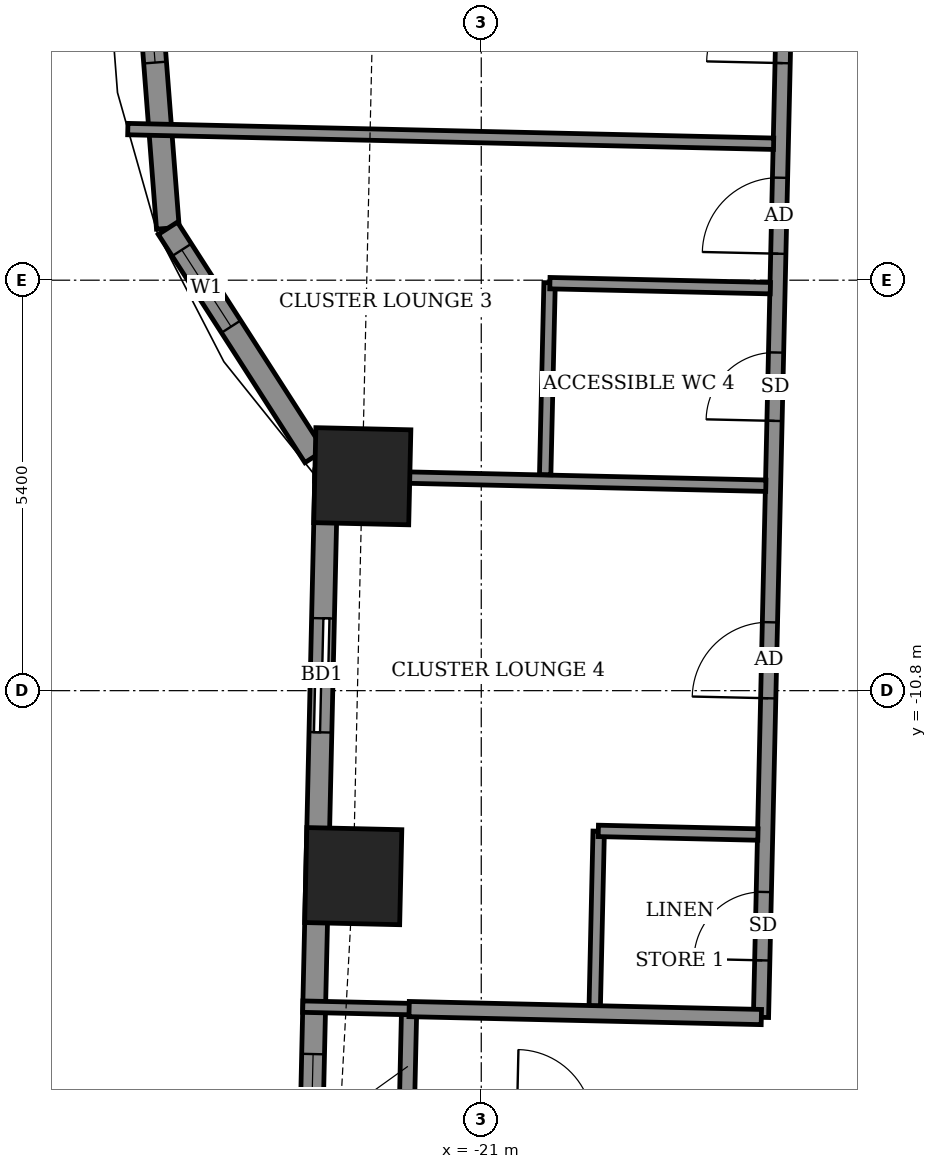
"""IFC4 building model, lengths in metres.
Left out: names, types, materials, properties, quantities, classifications, styles, units other than length and angle.
Written with IfcOpenShell. Run it as: python <this file> out.ifc"""

import sys

from ifc_helpers import new_model, si_unit, direction, frame, frame_2d, origin, origin_2d, place, context, subcontext, project, spatial, rectangle, extrude, element, fill, save


model = new_model("IFC4")
c1 = context("Model", 3, precision=1e-05, world=origin(), true_north=direction((0.0, 1.0)))
c2 = subcontext(c1, "Body", "Model", "MODEL_VIEW")
j1 = project(units=[si_unit("LENGTHUNIT", "METRE"), si_unit("PLANEANGLEUNIT", "RADIAN")], contexts=[c1])
p1 = place(None, origin())
s1 = spatial("IfcSite", under=j1, at=p1, CompositionType="ELEMENT")
p2 = place(p1, origin())
s2 = spatial("IfcBuilding", under=s1, at=p2, CompositionType="ELEMENT")
p3 = place(p2, frame((0.0, 0.0, 152.7)))
s3 = spatial("IfcBuildingStorey", under=s2, at=p3, CompositionType="ELEMENT", Elevation=152.7)
for number, where, z_axis, x_axis in (
    (1, (-22.565, -7.979, -0.55), (0.0, 0.0, 1.0), (-0.023, -1.0, 0.0)),
    (2, (-22.684, -13.24, -0.55), (0.0, 0.0, 1.0), (-0.023, -1.0, 0.0)),
):
    element("IfcColumn", number, at=place(p3, frame(where, z_axis=z_axis, x_axis=x_axis)), inside=s3, PredefinedType="COLUMN", context=c2, shape_type="SweptSolid", body=[
        extrude(rectangle(XDim=1.25, YDim=1.25, at=origin_2d()), origin(), (0.0, 0.0, 1.0), 3.6),
    ])
p4 = place(p3, frame((-25.552, 0.84, 0.0), z_axis=(0.0, 0.0, 1.0), x_axis=(0.076961115238, -0.997034095075, 0.0)))
e3 = element("IfcWall", 3, at=p4, inside=s3, PredefinedType="SOLIDWALL", context=c2, shape_type="SweptSolid", body=[
    extrude(rectangle(XDim=5.574, YDim=0.3, at=frame_2d((2.787, 0.0))), origin(), (0.0, 0.0, 1.0), 3.05),
])
p5 = place(p4, frame((2.187, 0.0, 0.9)))
e4 = element("IfcOpeningElement", 4, at=p5, cuts=e3, PredefinedType="OPENING", context=c2, shape_type="SweptSolid", body=[
    extrude(rectangle(XDim=1.2, YDim=1.5, at=frame_2d((0.6, 0.75))), frame((0.0, 0.16, 0.0), z_axis=(0.0, -1.0, 0.0), x_axis=(1.0, 0.0, 0.0)), (0.0, 0.0, 1.0), 0.32),
])
p6 = place(p3, frame((-25.123, -4.717, 0.0), z_axis=(0.0, 0.0, 1.0), x_axis=(0.54058467792, -0.841289608873, 0.0)))
e5 = element("IfcWall", 5, at=p6, inside=s3, PredefinedType="SOLIDWALL", context=c2, shape_type="SweptSolid", body=[
    extrude(rectangle(XDim=3.568, YDim=0.3, at=frame_2d((1.784, 0.0))), origin(), (0.0, 0.0, 1.0), 3.05),
])
p7 = place(p6, frame((0.338, 0.0, 0.9)))
e6 = element("IfcOpeningElement", 6, at=p7, cuts=e5, PredefinedType="OPENING", context=c2, shape_type="SweptSolid", body=[
    extrude(rectangle(XDim=1.2, YDim=1.5, at=frame_2d((0.6, 0.75))), frame((0.0, 0.16, 0.0), z_axis=(0.0, -1.0, 0.0), x_axis=(1.0, 0.0, 0.0)), (0.0, 0.0, 1.0), 0.32),
])
p8 = place(p3, frame((-23.038, -7.913, 0.0), z_axis=(0.0, 0.0, 1.0), x_axis=(-0.022705985163, -0.999742185885, 0.0)))
e7 = element("IfcWall", 7, at=p8, inside=s3, PredefinedType="SOLIDWALL", context=c2, shape_type="SweptSolid", body=[
    extrude(rectangle(XDim=10.43, YDim=0.3, at=frame_2d((5.215, 0.0))), origin(), (0.0, 0.0, 1.0), 3.05),
])
p9 = place(p8, frame((1.936, 0.0, 0.0)))
e8 = element("IfcOpeningElement", 8, at=p9, cuts=e7, PredefinedType="OPENING", context=c2, shape_type="SweptSolid", body=[
    extrude(rectangle(XDim=1.5, YDim=2.4, at=frame_2d((0.75, 1.2))), frame((0.0, 0.16, 0.0), z_axis=(0.0, -1.0, 0.0), x_axis=(1.0, 0.0, 0.0)), (0.0, 0.0, 1.0), 0.32),
])
p10 = place(p8, frame((7.67, 0.0, 0.9)))
e9 = element("IfcOpeningElement", 9, at=p10, cuts=e7, PredefinedType="OPENING", context=c2, shape_type="SweptSolid", body=[
    extrude(rectangle(XDim=1.2, YDim=1.5, at=frame_2d((0.6, 0.75))), frame((0.0, 0.16, 0.0), z_axis=(0.0, -1.0, 0.0), x_axis=(1.0, 0.0, 0.0)), (0.0, 0.0, 1.0), 0.32),
])
p11 = place(p3, frame((-25.988, -16.028, 0.0), z_axis=(0.0, 0.0, 1.0), x_axis=(0.022662255828, 0.999743178102, 0.0)))
e10 = element("IfcWall", 10, at=p11, inside=s3, PredefinedType="USERDEFINED", context=c2, shape_type="SweptSolid", body=[
    extrude(rectangle(XDim=6.0, YDim=0.55, at=frame_2d((3.0, 0.0))), origin(), (0.0, 0.0, 1.0), 0.8),
])
p12 = place(p3, frame((-21.983, -16.493, 0.0), z_axis=(0.0, 0.0, 1.0), x_axis=(0.022617910375, 0.999744182344, 0.0)))
e11 = element("IfcWall", 11, at=p12, inside=s3, PredefinedType="PARTITIONING", context=c2, shape_type="SweptSolid", body=[
    extrude(rectangle(XDim=1.5, YDim=0.2, at=frame_2d((0.75, 0.0))), origin(), (0.0, 0.0, 1.0), 3.05),
])
p13 = place(p3, frame((-19.507, -14.949, 0.0), z_axis=(0.0, 0.0, 1.0), x_axis=(0.022603288534, 0.999744513037, 0.0)))
e12 = element("IfcWall", 12, at=p13, inside=s3, PredefinedType="PARTITIONING", context=c2, shape_type="SweptSolid", body=[
    extrude(rectangle(XDim=2.301, YDim=0.15, at=frame_2d((1.15, 0.0))), origin(), (0.0, 0.0, 1.0), 3.05),
])
p14 = place(p3, frame((-17.32, -15.098, 0.0), z_axis=(0.0, 0.0, 1.0), x_axis=(0.022694293906, 0.999742451346, 0.0)))
e13 = element("IfcWall", 13, at=p14, inside=s3, PredefinedType="PARTITIONING", context=c2, shape_type="SweptSolid", body=[
    extrude(rectangle(XDim=28.024, YDim=0.2, at=frame_2d((14.012, 0.0))), origin(), (0.0, 0.0, 1.0), 3.05),
])
p15 = place(p14, frame((24.212, 0.0, 0.0)))
e14 = element("IfcOpeningElement", 14, at=p15, cuts=e13, PredefinedType="OPENING", context=c2, shape_type="SweptSolid", body=[
    extrude(rectangle(XDim=1.0, YDim=2.1, at=frame_2d((0.5, 1.05))), frame((0.0, 0.11, 0.0), z_axis=(0.0, -1.0, 0.0), x_axis=(1.0, 0.0, 0.0)), (0.0, 0.0, 1.0), 0.22),
])
p16 = place(p14, frame((26.374, 0.0, 0.0)))
e15 = element("IfcOpeningElement", 15, at=p16, cuts=e13, PredefinedType="OPENING", context=c2, shape_type="SweptSolid", body=[
    extrude(rectangle(XDim=0.9, YDim=2.1, at=frame_2d((0.45, 1.05))), frame((0.0, 0.11, 0.0), z_axis=(0.0, -1.0, 0.0), x_axis=(1.0, 0.0, 0.0)), (0.0, 0.0, 1.0), 0.22),
])
p17 = place(p14, frame((21.774, 0.0, 0.0)))
e16 = element("IfcOpeningElement", 16, at=p17, cuts=e13, PredefinedType="OPENING", context=c2, shape_type="SweptSolid", body=[
    extrude(rectangle(XDim=1.0, YDim=2.1, at=frame_2d((0.5, 1.05))), frame((0.0, 0.11, 0.0), z_axis=(0.0, -1.0, 0.0), x_axis=(1.0, 0.0, 0.0)), (0.0, 0.0, 1.0), 0.22),
])
p18 = place(p14, frame((18.65, 0.0, 0.0)))
e17 = element("IfcOpeningElement", 17, at=p18, cuts=e13, PredefinedType="OPENING", context=c2, shape_type="SweptSolid", body=[
    extrude(rectangle(XDim=1.0, YDim=2.1, at=frame_2d((0.5, 1.05))), frame((0.0, 0.11, 0.0), z_axis=(0.0, -1.0, 0.0), x_axis=(1.0, 0.0, 0.0)), (0.0, 0.0, 1.0), 0.22),
])
p19 = place(p14, frame((15.626, 0.0, 0.0)))
e18 = element("IfcOpeningElement", 18, at=p19, cuts=e13, PredefinedType="OPENING", context=c2, shape_type="SweptSolid", body=[
    extrude(rectangle(XDim=1.0, YDim=2.1, at=frame_2d((0.5, 1.05))), frame((0.0, 0.11, 0.0), z_axis=(0.0, -1.0, 0.0), x_axis=(1.0, 0.0, 0.0)), (0.0, 0.0, 1.0), 0.22),
])
p20 = place(p14, frame((12.557, 0.0, 0.0)))
e19 = element("IfcOpeningElement", 19, at=p20, cuts=e13, PredefinedType="OPENING", context=c2, shape_type="SweptSolid", body=[
    extrude(rectangle(XDim=1.0, YDim=2.1, at=frame_2d((0.5, 1.05))), frame((0.0, 0.11, 0.0), z_axis=(0.0, -1.0, 0.0), x_axis=(1.0, 0.0, 0.0)), (0.0, 0.0, 1.0), 0.22),
])
p21 = place(p14, frame((10.049, 0.0, 0.0)))
e20 = element("IfcOpeningElement", 20, at=p21, cuts=e13, PredefinedType="OPENING", context=c2, shape_type="SweptSolid", body=[
    extrude(rectangle(XDim=1.0, YDim=2.1, at=frame_2d((0.5, 1.05))), frame((0.0, 0.11, 0.0), z_axis=(0.0, -1.0, 0.0), x_axis=(1.0, 0.0, 0.0)), (0.0, 0.0, 1.0), 0.22),
])
p22 = place(p14, frame((7.849, 0.0, 0.0)))
e21 = element("IfcOpeningElement", 21, at=p22, cuts=e13, PredefinedType="OPENING", context=c2, shape_type="SweptSolid", body=[
    extrude(rectangle(XDim=0.9, YDim=2.1, at=frame_2d((0.45, 1.05))), frame((0.0, 0.11, 0.0), z_axis=(0.0, -1.0, 0.0), x_axis=(1.0, 0.0, 0.0)), (0.0, 0.0, 1.0), 0.22),
])
p23 = place(p14, frame((4.199, 0.0, 0.0)))
e22 = element("IfcOpeningElement", 22, at=p23, cuts=e13, PredefinedType="OPENING", context=c2, shape_type="SweptSolid", body=[
    extrude(rectangle(XDim=1.0, YDim=2.1, at=frame_2d((0.5, 1.05))), frame((0.0, 0.11, 0.0), z_axis=(0.0, -1.0, 0.0), x_axis=(1.0, 0.0, 0.0)), (0.0, 0.0, 1.0), 0.22),
])
p24 = place(p14, frame((0.75, 0.0, 0.0)))
e23 = element("IfcOpeningElement", 23, at=p24, cuts=e13, PredefinedType="OPENING", context=c2, shape_type="SweptSolid", body=[
    extrude(rectangle(XDim=0.9, YDim=2.1, at=frame_2d((0.45, 1.05))), frame((0.0, 0.11, 0.0), z_axis=(0.0, -1.0, 0.0), x_axis=(1.0, 0.0, 0.0)), (0.0, 0.0, 1.0), 0.22),
])
p25 = place(p3, frame((-23.348, -14.957, 0.0), z_axis=(0.0, 0.0, 1.0), x_axis=(0.999740216184, -0.022792545827, 0.0)))
e24 = element("IfcWall", 24, at=p25, inside=s3, PredefinedType="PARTITIONING", context=c2, shape_type="SweptSolid", body=[
    extrude(rectangle(XDim=1.403, YDim=0.15, at=frame_2d((0.702, 0.0))), origin(), (0.0, 0.0, 1.0), 2.55),
])
p26 = place(p3, frame((-21.949, -14.989, 0.0), z_axis=(0.0, 0.0, 1.0), x_axis=(0.999743491588, -0.022648422179, 0.0)))
e25 = element("IfcWall", 25, at=p26, inside=s3, PredefinedType="PARTITIONING", context=c2, shape_type="SweptSolid", body=[
    extrude(rectangle(XDim=4.635, YDim=0.2, at=frame_2d((2.318, 0.0))), origin(), (0.0, 0.0, 1.0), 3.05),
])
p27 = place(p3, frame((-19.46, -12.645, 0.0), z_axis=(0.0, 0.0, 1.0), x_axis=(0.999737799372, -0.022898307927, 0.0)))
e26 = element("IfcWall", 26, at=p27, inside=s3, PredefinedType="PARTITIONING", context=c2, shape_type="SweptSolid", body=[
    extrude(rectangle(XDim=2.1, YDim=0.15, at=frame_2d((1.05, 0.0))), origin(), (0.0, 0.0, 1.0), 3.05),
])
p28 = place(p3, frame((-23.19, -7.969, 0.0), z_axis=(0.0, 0.0, 1.0), x_axis=(0.999741261868, -0.022746633113, 0.0)))
e27 = element("IfcWall", 27, at=p28, inside=s3, PredefinedType="PARTITIONING", context=c2, shape_type="SweptSolid", body=[
    extrude(rectangle(XDim=5.935, YDim=0.15, at=frame_2d((2.968, 0.0))), origin(), (0.0, 0.0, 1.0), 3.05),
])
p29 = place(p3, frame((-20.159, -7.958, 0.0), z_axis=(0.0, 0.0, 1.0), x_axis=(0.022919108675, 0.999737322729, 0.0)))
e28 = element("IfcWall", 28, at=p29, inside=s3, PredefinedType="PARTITIONING", context=c2, shape_type="SweptSolid", body=[
    extrude(rectangle(XDim=2.525, YDim=0.15, at=frame_2d((1.262, 0.0))), origin(), (0.0, 0.0, 1.0), 3.05),
])
p30 = place(p3, frame((-20.097, -5.439, 0.0), z_axis=(0.0, 0.0, 1.0), x_axis=(0.999741748633, -0.022725229174, 0.0)))
e29 = element("IfcWall", 29, at=p30, inside=s3, PredefinedType="PARTITIONING", context=c2, shape_type="SweptSolid", body=[
    extrude(rectangle(XDim=2.901, YDim=0.15, at=frame_2d((1.45, 0.0))), origin(), (0.0, 0.0, 1.0), 3.05),
])
p31 = place(p3, frame((-25.65, -3.412, 0.0), z_axis=(0.0, 0.0, 1.0), x_axis=(0.999742413658, -0.022695954102, 0.0)))
e30 = element("IfcWall", 30, at=p31, inside=s3, PredefinedType="PARTITIONING", context=c2, shape_type="SweptSolid", body=[
    extrude(rectangle(XDim=8.498, YDim=0.15, at=frame_2d((4.249, 0.0))), origin(), (0.0, 0.0, 1.0), 2.05),
])
p32 = place(p5, origin())
e31 = element("IfcWindow", 31, at=p32, inside=s3, PartitioningType="SINGLE_PANEL", PredefinedType="WINDOW", context=c2, shape_type="SweptSolid", body=[
    extrude(rectangle(XDim=1.2, YDim=1.5, at=frame_2d((0.6, 0.75))), frame((0.0, 0.03, 0.0), z_axis=(0.0, -1.0, 0.0), x_axis=(1.0, 0.0, 0.0)), (0.0, 0.0, 1.0), 0.06),
])
fill(e4, e31)
p33 = place(p7, origin())
e32 = element("IfcWindow", 32, at=p33, inside=s3, PartitioningType="SINGLE_PANEL", PredefinedType="WINDOW", context=c2, shape_type="SweptSolid", body=[
    extrude(rectangle(XDim=1.2, YDim=1.5, at=frame_2d((0.6, 0.75))), frame((0.0, 0.03, 0.0), z_axis=(0.0, -1.0, 0.0), x_axis=(1.0, 0.0, 0.0)), (0.0, 0.0, 1.0), 0.06),
])
fill(e6, e32)
p34 = place(p9, origin())
e33 = element("IfcDoor", 33, at=p34, inside=s3, OperationType="SLIDING_TO_LEFT", PredefinedType="DOOR", context=c2, shape_type="SweptSolid", body=[
    extrude(rectangle(XDim=1.5, YDim=2.4, at=frame_2d((0.75, 1.2))), frame((0.0, 0.025, 0.0), z_axis=(0.0, -1.0, 0.0), x_axis=(1.0, 0.0, 0.0)), (0.0, 0.0, 1.0), 0.05),
])
fill(e8, e33)
p35 = place(p10, origin())
e34 = element("IfcWindow", 34, at=p35, inside=s3, PartitioningType="SINGLE_PANEL", PredefinedType="WINDOW", context=c2, shape_type="SweptSolid", body=[
    extrude(rectangle(XDim=1.2, YDim=1.5, at=frame_2d((0.6, 0.75))), frame((0.0, 0.03, 0.0), z_axis=(0.0, -1.0, 0.0), x_axis=(1.0, 0.0, 0.0)), (0.0, 0.0, 1.0), 0.06),
])
fill(e9, e34)
p36 = place(p20, origin())
e35 = element("IfcDoor", 35, at=p36, inside=s3, OperationType="SINGLE_SWING_LEFT", PredefinedType="DOOR", context=c2, shape_type="SweptSolid", body=[
    extrude(rectangle(XDim=1.0, YDim=2.1, at=frame_2d((0.5, 1.05))), frame((0.0, 0.025, 0.0), z_axis=(0.0, -1.0, 0.0), x_axis=(1.0, 0.0, 0.0)), (0.0, 0.0, 1.0), 0.05),
])
fill(e19, e35)
p37 = place(p21, origin())
e36 = element("IfcDoor", 36, at=p37, inside=s3, OperationType="SINGLE_SWING_RIGHT", PredefinedType="DOOR", context=c2, shape_type="SweptSolid", body=[
    extrude(rectangle(XDim=1.0, YDim=2.1, at=frame_2d((0.5, 1.05))), frame((0.0, 0.025, 0.0), z_axis=(0.0, -1.0, 0.0), x_axis=(1.0, 0.0, 0.0)), (0.0, 0.0, 1.0), 0.05),
])
fill(e20, e36)
p38 = place(p22, origin())
e37 = element("IfcDoor", 37, at=p38, inside=s3, OperationType="SINGLE_SWING_RIGHT", PredefinedType="DOOR", context=c2, shape_type="SweptSolid", body=[
    extrude(rectangle(XDim=0.9, YDim=2.1, at=frame_2d((0.45, 1.05))), frame((0.0, 0.025, 0.0), z_axis=(0.0, -1.0, 0.0), x_axis=(1.0, 0.0, 0.0)), (0.0, 0.0, 1.0), 0.05),
])
fill(e21, e37)
p39 = place(p23, origin())
e38 = element("IfcDoor", 38, at=p39, inside=s3, OperationType="SINGLE_SWING_LEFT", PredefinedType="DOOR", context=c2, shape_type="SweptSolid", body=[
    extrude(rectangle(XDim=1.0, YDim=2.1, at=frame_2d((0.5, 1.05))), frame((0.0, 0.025, 0.0), z_axis=(0.0, -1.0, 0.0), x_axis=(1.0, 0.0, 0.0)), (0.0, 0.0, 1.0), 0.05),
])
fill(e22, e38)
p40 = place(p24, origin())
e39 = element("IfcDoor", 39, at=p40, inside=s3, OperationType="SINGLE_SWING_LEFT", PredefinedType="DOOR", context=c2, shape_type="SweptSolid", body=[
    extrude(rectangle(XDim=0.9, YDim=2.1, at=frame_2d((0.45, 1.05))), frame((0.0, 0.025, 0.0), z_axis=(0.0, -1.0, 0.0), x_axis=(1.0, 0.0, 0.0)), (0.0, 0.0, 1.0), 0.05),
])
fill(e23, e39)
save(model, sys.argv[1])
